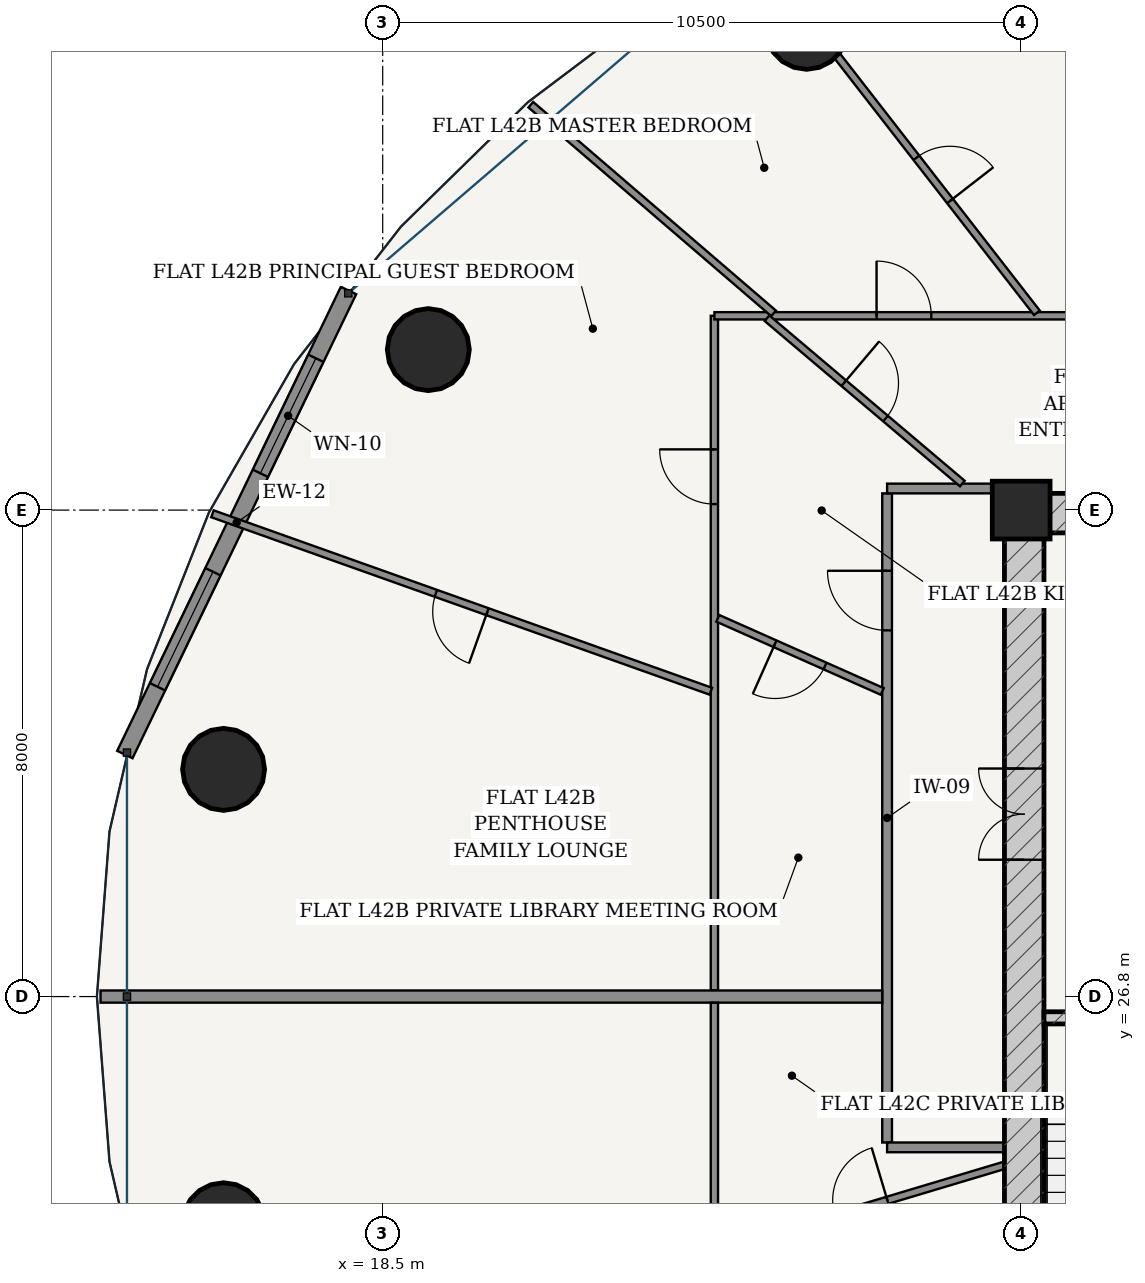
"""IFC4 building model, lengths in metres.
Left out: names, types, materials, properties, quantities, classifications, styles, units other than length and angle.
Written with IfcOpenShell. Run it as: python <this file> out.ifc"""

import sys

from ifc_helpers import new_model, si_unit, direction, frame, frame_2d, origin, origin_2d, place, context, subcontext, project, spatial, rectangle, hollow_circle, extrude, source, transform, mapped, element, fill, save


model = new_model("IFC4")
c1 = context("Model", 3, precision=1e-05, world=origin(), true_north=direction((-0.2419218956, 0.970295726276)))
c2 = subcontext(c1, "Body", "Model", "MODEL_VIEW")
j1 = project(units=[si_unit("LENGTHUNIT", "METRE"), si_unit("PLANEANGLEUNIT", "RADIAN")], contexts=[c1])
p1 = place(None, origin())
s1 = spatial("IfcSite", under=j1, at=p1, CompositionType="ELEMENT")
p2 = place(p1, origin())
s2 = spatial("IfcBuilding", under=s1, at=p2, CompositionType="ELEMENT")
p3 = place(p2, frame((0.0, 0.0, 160.6)))
s3 = spatial("IfcBuildingStorey", under=s2, at=p3, CompositionType="ELEMENT", Elevation=160.6)
p4 = place(p3, frame((29.0, 34.8, 0.0), z_axis=(0.0, 0.0, 1.0), x_axis=(1.0, 0.0, 0.0)))
e1 = element("IfcColumn", 1, at=p4, inside=s3, PredefinedType="COLUMN", context=c2, shape_type="SweptSolid", body=[
    extrude(rectangle(XDim=0.95, YDim=0.95, at=origin_2d()), origin(), (0.0, 0.0, 1.0), 3.6),
])
p5 = place(p3, frame((28.725, 34.75, 0.0), z_axis=(0.0, 0.0, 1.0), x_axis=(1.0, 0.0, 0.0)))
e2 = element("IfcWall", 2, at=p5, inside=s3, PredefinedType="SHEAR", context=c2, shape_type="SweptSolid", body=[
    extrude(rectangle(XDim=18.55, YDim=0.65, at=frame_2d((9.275, 0.0))), origin(), (0.0, 0.0, 1.0), 3.33),
])
p6 = place(p3, frame((29.05, 19.175, 0.0), z_axis=(0.0, 0.0, 1.0), x_axis=(0.0, 1.0, 0.0)))
e3 = element("IfcWall", 3, at=p6, inside=s3, PredefinedType="SHEAR", context=c2, shape_type="SweptSolid", body=[
    extrude(rectangle(XDim=15.25, YDim=0.65, at=frame_2d((7.625, 0.0))), origin(), (0.0, 0.0, 1.0), 3.33),
])
p7 = place(p6, frame((9.875, 0.0, 0.0)))
e4 = element("IfcOpeningElement", 4, at=p7, cuts=e3, PredefinedType="OPENING", context=c2, shape_type="SweptSolid", body=[
    extrude(rectangle(XDim=1.5, YDim=2.2, at=frame_2d((0.75, 1.1))), frame((0.0, 0.335, 0.0), z_axis=(0.0, -1.0, 0.0), x_axis=(1.0, 0.0, 0.0)), (0.0, 0.0, 1.0), 0.67),
])
p8 = place(p3, frame((29.375, 26.45, 0.0), z_axis=(0.0, 0.0, 1.0), x_axis=(1.0, 0.0, 0.0)))
e5 = element("IfcWall", 5, at=p8, inside=s3, PredefinedType="SOLIDWALL", context=c2, shape_type="SweptSolid", body=[
    extrude(rectangle(XDim=3.32, YDim=0.2, at=frame_2d((1.66, 0.0))), origin(), (0.0, 0.0, 1.0), 3.33),
])
p9 = place(p8, frame((1.185, 0.0, 0.0)))
e6 = element("IfcOpeningElement", 6, at=p9, cuts=e5, PredefinedType="OPENING", context=c2, shape_type="SweptSolid", body=[
    extrude(rectangle(XDim=0.95, YDim=2.15, at=frame_2d((0.475, 1.075))), frame((0.0, 0.11, 0.0), z_axis=(0.0, -1.0, 0.0), x_axis=(1.0, 0.0, 0.0)), (0.0, 0.0, 1.0), 0.22),
])
for number, where, z_axis, x_axis in (
    (7, (25.472, 42.723, 0.0), (0.0, 0.0, 1.0), (1.0, 0.0, 0.0)),
    (8, (19.25, 37.439, 0.0), (0.0, 0.0, 1.0), (1.0, 0.0, 0.0)),
    (9, (15.883, 30.536, 0.0), (0.0, 0.0, 1.0), (1.0, 0.0, 0.0)),
    (10, (15.883, 23.064, 0.0), (0.0, 0.0, 1.0), (1.0, 0.0, 0.0)),
):
    element("IfcColumn", number, at=place(p3, frame(where, z_axis=z_axis, x_axis=x_axis)), inside=s3, PredefinedType="COLUMN", context=c2, shape_type="SweptSolid", body=[
        extrude(hollow_circle(Radius=0.675, WallThickness=0.042, at=origin_2d()), origin(), (0.0, 0.0, 1.0), 3.6),
    ])
p10 = place(p3, frame((17.938, 38.411, 0.0), z_axis=(0.0, 0.0, 1.0), x_axis=(-0.434209827226, -0.900811759437, 0.0)))
e11 = element("IfcWall", 11, at=p10, inside=s3, PredefinedType="SOLIDWALL", context=c2, shape_type="SweptSolid", body=[
    extrude(rectangle(XDim=8.472, YDim=0.28, at=frame_2d((4.236, 0.0))), origin(), (0.0, 0.0, 1.0), 3.33),
])
p11 = place(p10, frame((1.237, 0.0, 0.85)))
e12 = element("IfcOpeningElement", 12, at=p11, cuts=e11, PredefinedType="OPENING", context=c2, shape_type="SweptSolid", body=[
    extrude(rectangle(XDim=2.1, YDim=1.95, at=frame_2d((1.05, 0.975))), frame((0.0, 0.15, 0.0), z_axis=(0.0, -1.0, 0.0), x_axis=(1.0, 0.0, 0.0)), (0.0, 0.0, 1.0), 0.3),
])
p12 = place(p10, frame((5.134, 0.0, 0.85)))
e13 = element("IfcOpeningElement", 13, at=p12, cuts=e11, PredefinedType="OPENING", context=c2, shape_type="SweptSolid", body=[
    extrude(rectangle(XDim=2.1, YDim=1.95, at=frame_2d((1.05, 0.975))), frame((0.0, 0.15, 0.0), z_axis=(0.0, -1.0, 0.0), x_axis=(1.0, 0.0, 0.0)), (0.0, 0.0, 1.0), 0.3),
])
p13 = place(p3, frame((26.795, 24.4, 0.0), z_axis=(0.0, 0.0, 1.0), x_axis=(0.0, 1.0, 0.0)))
e14 = element("IfcWall", 14, at=p13, inside=s3, PredefinedType="PARTITIONING", context=c2, shape_type="SweptSolid", body=[
    extrude(rectangle(XDim=10.675, YDim=0.16, at=frame_2d((5.337, 0.0))), origin(), (0.0, 0.0, 1.0), 2.776),
])
p14 = place(p13, frame((8.422, 0.0, 0.0)))
e15 = element("IfcOpeningElement", 15, at=p14, cuts=e14, PredefinedType="OPENING", context=c2, shape_type="SweptSolid", body=[
    extrude(rectangle(XDim=0.98, YDim=2.2, at=frame_2d((0.49, 1.1))), frame((0.0, 0.09, 0.0), z_axis=(0.0, -1.0, 0.0), x_axis=(1.0, 0.0, 0.0)), (0.0, 0.0, 1.0), 0.18),
])
p15 = place(p3, frame((26.795, 35.155, 0.0), z_axis=(0.0, 0.0, 1.0), x_axis=(1.0, 0.0, 0.0)))
e16 = element("IfcWall", 16, at=p15, inside=s3, PredefinedType="PARTITIONING", context=c2, shape_type="SweptSolid", body=[
    extrude(rectangle(XDim=1.93, YDim=0.16, at=frame_2d((0.965, 0.0))), origin(), (0.0, 0.0, 1.0), 2.776),
])
p16 = place(p3, frame((26.795, 24.32, 0.0), z_axis=(0.0, 0.0, 1.0), x_axis=(1.0, 0.0, 0.0)))
e17 = element("IfcWall", 17, at=p16, inside=s3, PredefinedType="PARTITIONING", context=c2, shape_type="SweptSolid", body=[
    extrude(rectangle(XDim=1.93, YDim=0.16, at=frame_2d((0.965, 0.0))), origin(), (0.0, 0.0, 1.0), 3.33),
])
p17 = place(p3, frame((23.955, 26.902, 0.0), z_axis=(0.0, 0.0, 1.0), x_axis=(0.0, 1.0, 0.0)))
e18 = element("IfcWall", 18, at=p17, inside=s3, PredefinedType="PARTITIONING", context=c2, shape_type="SweptSolid", body=[
    extrude(rectangle(XDim=11.093, YDim=0.12, at=frame_2d((5.546, 0.0))), origin(), (0.0, 0.0, 1.0), 2.776),
])
p18 = place(p17, frame((7.997, 0.0, 0.0)))
e19 = element("IfcOpeningElement", 19, at=p18, cuts=e18, PredefinedType="OPENING", context=c2, shape_type="SweptSolid", body=[
    extrude(rectangle(XDim=0.9, YDim=2.15, at=frame_2d((0.45, 1.075))), frame((0.0, 0.07, 0.0), z_axis=(0.0, -1.0, 0.0), x_axis=(1.0, 0.0, 0.0)), (0.0, 0.0, 1.0), 0.14),
])
p19 = place(p3, frame((23.955, 37.995, 0.0), z_axis=(0.0, 0.0, 1.0), x_axis=(1.0, 0.0, 0.0)))
e20 = element("IfcWall", 20, at=p19, inside=s3, PredefinedType="PARTITIONING", context=c2, shape_type="SweptSolid", body=[
    extrude(rectangle(XDim=7.69, YDim=0.12, at=frame_2d((3.845, 0.0))), origin(), (0.0, 0.0, 1.0), 2.776),
])
p20 = place(p19, frame((2.667, 0.0, 0.0)))
e21 = element("IfcOpeningElement", 21, at=p20, cuts=e20, PredefinedType="OPENING", context=c2, shape_type="SweptSolid", body=[
    extrude(rectangle(XDim=0.9, YDim=2.15, at=frame_2d((0.45, 1.075))), frame((0.0, 0.07, 0.0), z_axis=(0.0, -1.0, 0.0), x_axis=(1.0, 0.0, 0.0)), (0.0, 0.0, 1.0), 0.14),
])
p21 = place(p3, frame((29.259, 38.044, 0.0), z_axis=(0.0, 0.0, 1.0), x_axis=(-0.613770587295, 0.789484430607, 0.0)))
e22 = element("IfcWall", 22, at=p21, inside=s3, PredefinedType="PARTITIONING", context=c2, shape_type="SweptSolid", body=[
    extrude(rectangle(XDim=7.556, YDim=0.12, at=frame_2d((3.778, 0.0))), origin(), (0.0, 0.0, 1.0), 2.776),
])
p22 = place(p21, frame((2.33, 0.0, 0.0)))
e23 = element("IfcOpeningElement", 23, at=p22, cuts=e22, PredefinedType="OPENING", context=c2, shape_type="SweptSolid", body=[
    extrude(rectangle(XDim=0.9, YDim=2.15, at=frame_2d((0.45, 1.075))), frame((0.0, 0.07, 0.0), z_axis=(0.0, -1.0, 0.0), x_axis=(1.0, 0.0, 0.0)), (0.0, 0.0, 1.0), 0.14),
])
p23 = place(p3, frame((24.928, 38.035, 0.0), z_axis=(0.0, 0.0, 1.0), x_axis=(-0.758368609512, 0.65182593697, 0.0)))
e24 = element("IfcWall", 24, at=p23, inside=s3, PredefinedType="PARTITIONING", context=c2, shape_type="SweptSolid", body=[
    extrude(rectangle(XDim=5.263, YDim=0.12, at=frame_2d((2.632, 0.0))), origin(), (0.0, 0.0, 1.0), 2.846),
])
p24 = place(p3, frame((23.896, 31.821, 0.0), z_axis=(0.0, 0.0, 1.0), x_axis=(-0.942072876428, 0.335408251983, 0.0)))
e25 = element("IfcWall", 25, at=p24, inside=s3, PredefinedType="PARTITIONING", context=c2, shape_type="SweptSolid", body=[
    extrude(rectangle(XDim=8.7, YDim=0.12, at=frame_2d((4.35, 0.0))), origin(), (0.0, 0.0, 1.0), 2.846),
])
p25 = place(p24, frame((3.9, 0.0, 0.0)))
e26 = element("IfcOpeningElement", 26, at=p25, cuts=e25, PredefinedType="OPENING", context=c2, shape_type="SweptSolid", body=[
    extrude(rectangle(XDim=0.9, YDim=2.15, at=frame_2d((0.45, 1.075))), frame((0.0, 0.07, 0.0), z_axis=(0.0, -1.0, 0.0), x_axis=(1.0, 0.0, 0.0)), (0.0, 0.0, 1.0), 0.14),
])
p26 = place(p3, frame((28.032, 35.236, 0.0), z_axis=(0.0, 0.0, 1.0), x_axis=(-0.763324664245, 0.646015059388, 0.0)))
e27 = element("IfcWall", 27, at=p26, inside=s3, PredefinedType="PARTITIONING", context=c2, shape_type="SweptSolid", body=[
    extrude(rectangle(XDim=4.208, YDim=0.12, at=frame_2d((2.104, 0.0))), origin(), (0.0, 0.0, 1.0), 3.005),
])
p27 = place(p26, frame((1.654, 0.0, 0.0)))
e28 = element("IfcOpeningElement", 28, at=p27, cuts=e27, PredefinedType="OPENING", context=c2, shape_type="SweptSolid", body=[
    extrude(rectangle(XDim=0.9, YDim=2.15, at=frame_2d((0.45, 1.075))), frame((0.0, 0.07, 0.0), z_axis=(0.0, -1.0, 0.0), x_axis=(1.0, 0.0, 0.0)), (0.0, 0.0, 1.0), 0.14),
])
p28 = place(p3, frame((26.715, 31.818, 0.0), z_axis=(0.0, 0.0, 1.0), x_axis=(-0.91376049718, 0.406253312347, 0.0)))
e29 = element("IfcWall", 29, at=p28, inside=s3, PredefinedType="PARTITIONING", context=c2, shape_type="SweptSolid", body=[
    extrude(rectangle(XDim=2.958, YDim=0.12, at=frame_2d((1.479, 0.0))), origin(), (0.0, 0.0, 1.0), 3.33),
])
p29 = place(p28, frame((1.029, 0.0, 0.0)))
e30 = element("IfcOpeningElement", 30, at=p29, cuts=e29, PredefinedType="OPENING", context=c2, shape_type="SweptSolid", body=[
    extrude(rectangle(XDim=0.9, YDim=2.15, at=frame_2d((0.45, 1.075))), frame((0.0, 0.07, 0.0), z_axis=(0.0, -1.0, 0.0), x_axis=(1.0, 0.0, 0.0)), (0.0, 0.0, 1.0), 0.14),
])
p30 = place(p3, frame((26.715, 26.8, 0.0), z_axis=(0.0, 0.0, 1.0), x_axis=(-1.0, 0.0, 0.0)))
e31 = element("IfcWall", 31, at=p30, inside=s3, PredefinedType="PARTITIONING", context=c2, shape_type="SweptSolid", body=[
    extrude(rectangle(XDim=12.855, YDim=0.2, at=frame_2d((6.427, 0.0))), origin(), (0.0, 0.0, 1.0), 2.846),
])
p31 = place(p3, frame((23.955, 21.48, 0.0), z_axis=(0.0, 0.0, 1.0), x_axis=(0.0, 1.0, 0.0)))
e32 = element("IfcWall", 32, at=p31, inside=s3, PredefinedType="PARTITIONING", context=c2, shape_type="SweptSolid", body=[
    extrude(rectangle(XDim=5.218, YDim=0.12, at=frame_2d((2.609, 0.0))), origin(), (0.0, 0.0, 1.0), 2.776),
])
p32 = place(p3, frame((28.723, 24.025, 0.0), z_axis=(0.0, 0.0, 1.0), x_axis=(-0.958046115523, -0.286614096882, 0.0)))
e33 = element("IfcWall", 33, at=p32, inside=s3, PredefinedType="PARTITIONING", context=c2, shape_type="SweptSolid", body=[
    extrude(rectangle(XDim=4.915, YDim=0.12, at=frame_2d((2.458, 0.0))), origin(), (0.0, 0.0, 1.0), 3.33),
])
p33 = place(p32, frame((2.007, 0.0, 0.0)))
e34 = element("IfcOpeningElement", 34, at=p33, cuts=e33, PredefinedType="OPENING", context=c2, shape_type="SweptSolid", body=[
    extrude(rectangle(XDim=0.9, YDim=2.15, at=frame_2d((0.45, 1.075))), frame((0.0, 0.07, 0.0), z_axis=(0.0, -1.0, 0.0), x_axis=(1.0, 0.0, 0.0)), (0.0, 0.0, 1.0), 0.14),
])
m1 = source(origin(), c2, "Body", "SweptSolid", [
    extrude(rectangle(XDim=2.1, YDim=1.95, at=frame_2d((1.05, 0.975))), frame((0.0, 0.03, 0.0), z_axis=(0.0, -1.0, 0.0), x_axis=(1.0, 0.0, 0.0)), (0.0, 0.0, 1.0), 0.06),
])
p34 = place(p11, origin())
e35 = element("IfcWindow", 35, at=p34, inside=s3, PartitioningType="SINGLE_PANEL", PredefinedType="WINDOW", context=c2, shape_type="MappedRepresentation", body=[
    mapped(m1, transform((0.0, 0.0, 0.0), scale=1.0)),
])
fill(e12, e35)
p35 = place(p12, origin())
e36 = element("IfcWindow", 36, at=p35, inside=s3, PartitioningType="SINGLE_PANEL", PredefinedType="WINDOW", context=c2, shape_type="MappedRepresentation", body=[
    mapped(m1, transform((0.0, 0.0, 0.0), scale=1.0)),
])
fill(e13, e36)
m2 = source(origin(), c2, "Body", "SweptSolid", [
    extrude(rectangle(XDim=1.5, YDim=2.2, at=frame_2d((0.75, 1.1))), frame((0.0, 0.025, 0.0), z_axis=(0.0, -1.0, 0.0), x_axis=(1.0, 0.0, 0.0)), (0.0, 0.0, 1.0), 0.05),
])
p36 = place(p7, origin())
e37 = element("IfcDoor", 37, at=p36, inside=s3, OperationType="DOUBLE_DOOR_SINGLE_SWING", PredefinedType="DOOR", context=c2, shape_type="MappedRepresentation", body=[
    mapped(m2, transform((0.0, 0.0, 0.0), scale=1.0)),
])
fill(e4, e37)
m3 = source(origin(), c2, "Body", "SweptSolid", [
    extrude(rectangle(XDim=0.98, YDim=2.2, at=frame_2d((0.49, 1.1))), frame((0.0, 0.025, 0.0), z_axis=(0.0, -1.0, 0.0), x_axis=(1.0, 0.0, 0.0)), (0.0, 0.0, 1.0), 0.05),
])
p37 = place(p14, origin())
e38 = element("IfcDoor", 38, at=p37, inside=s3, OperationType="SINGLE_SWING_RIGHT", PredefinedType="DOOR", context=c2, shape_type="MappedRepresentation", body=[
    mapped(m3, transform((0.0, 0.0, 0.0), scale=1.0)),
])
fill(e15, e38)
m4 = source(origin(), c2, "Body", "SweptSolid", [
    extrude(rectangle(XDim=0.9, YDim=2.15, at=frame_2d((0.45, 1.075))), frame((0.0, 0.025, 0.0), z_axis=(0.0, -1.0, 0.0), x_axis=(1.0, 0.0, 0.0)), (0.0, 0.0, 1.0), 0.05),
])
p38 = place(p27, frame((0.9, 0.0, 0.0), z_axis=(0.0, 0.0, 1.0), x_axis=(-1.0, 0.0, 0.0)))
e39 = element("IfcDoor", 39, at=p38, inside=s3, OperationType="SINGLE_SWING_LEFT", PredefinedType="DOOR", context=c2, shape_type="MappedRepresentation", body=[
    mapped(m4, transform((0.0, 0.0, 0.0), scale=1.0)),
])
fill(e28, e39)
p39 = place(p29, origin())
e40 = element("IfcDoor", 40, at=p39, inside=s3, OperationType="SINGLE_SWING_RIGHT", PredefinedType="DOOR", context=c2, shape_type="MappedRepresentation", body=[
    mapped(m4, transform((0.0, 0.0, 0.0), scale=1.0)),
])
fill(e30, e40)
p40 = place(p20, origin())
e41 = element("IfcDoor", 41, at=p40, inside=s3, OperationType="SINGLE_SWING_LEFT", PredefinedType="DOOR", context=c2, shape_type="MappedRepresentation", body=[
    mapped(m4, transform((0.0, 0.0, 0.0), scale=1.0)),
])
fill(e21, e41)
p41 = place(p18, origin())
e42 = element("IfcDoor", 42, at=p41, inside=s3, OperationType="SINGLE_SWING_RIGHT", PredefinedType="DOOR", context=c2, shape_type="MappedRepresentation", body=[
    mapped(m4, transform((0.0, 0.0, 0.0), scale=1.0)),
])
fill(e19, e42)
p42 = place(p22, frame((0.9, 0.0, 0.0), z_axis=(0.0, 0.0, 1.0), x_axis=(-1.0, 0.0, 0.0)))
e43 = element("IfcDoor", 43, at=p42, inside=s3, OperationType="SINGLE_SWING_RIGHT", PredefinedType="DOOR", context=c2, shape_type="MappedRepresentation", body=[
    mapped(m4, transform((0.0, 0.0, 0.0), scale=1.0)),
])
fill(e23, e43)
p43 = place(p25, origin())
e44 = element("IfcDoor", 44, at=p43, inside=s3, OperationType="SINGLE_SWING_LEFT", PredefinedType="DOOR", context=c2, shape_type="MappedRepresentation", body=[
    mapped(m4, transform((0.0, 0.0, 0.0), scale=1.0)),
])
fill(e26, e44)
p44 = place(p33, frame((0.9, 0.0, 0.0), z_axis=(0.0, 0.0, 1.0), x_axis=(-1.0, 0.0, 0.0)))
e45 = element("IfcDoor", 45, at=p44, inside=s3, OperationType="SINGLE_SWING_RIGHT", PredefinedType="DOOR", context=c2, shape_type="MappedRepresentation", body=[
    mapped(m4, transform((0.0, 0.0, 0.0), scale=1.0)),
])
fill(e34, e45)
save(model, sys.argv[1])
